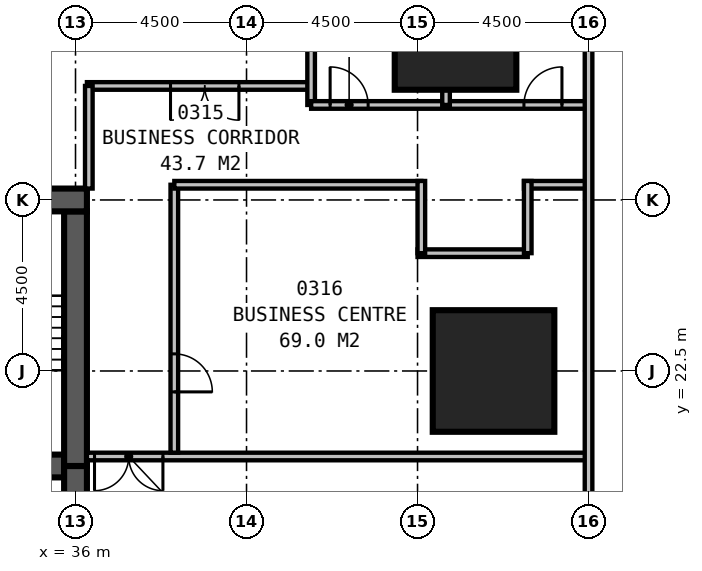
"""IFC4 building model, lengths in metres.
Left out: names, types, materials, properties, quantities, classifications, styles, units other than length and angle.
Written with IfcOpenShell. Run it as: python <this file> out.ifc"""

import sys

from ifc_helpers import new_model, si_unit, direction, frame, frame_2d, origin, origin_2d, place, context, subcontext, project, spatial, rectangle, extrude, element, fill, save


model = new_model("IFC4")
c1 = context("Model", 3, precision=1e-05, world=origin(), true_north=direction((0.0, 1.0)))
c2 = subcontext(c1, "Body", "Model", "MODEL_VIEW")
j1 = project(units=[si_unit("LENGTHUNIT", "METRE"), si_unit("PLANEANGLEUNIT", "RADIAN")], contexts=[c1])
p1 = place(None, origin())
s1 = spatial("IfcSite", under=j1, at=p1, CompositionType="ELEMENT")
p2 = place(p1, origin())
s2 = spatial("IfcBuilding", under=s1, at=p2, CompositionType="ELEMENT")
p3 = place(p2, frame((0.0, 0.0, 19.0)))
s3 = spatial("IfcBuildingStorey", under=s2, at=p3, CompositionType="ELEMENT", Elevation=19.0)
for number, where, z_axis, x_axis in (
    (1, (47.0, 22.5, 0.0), (0.0, 0.0, 1.0), (1.0, 0.0, 0.0)),
    (2, (46.0, 31.5, 0.0), (0.0, 0.0, 1.0), (1.0, 0.0, 0.0)),
):
    element("IfcColumn", number, at=place(p3, frame(where, z_axis=z_axis, x_axis=x_axis)), inside=s3, PredefinedType="COLUMN", context=c2, shape_type="SweptSolid", body=[
        extrude(rectangle(XDim=3.2, YDim=3.2, at=origin_2d()), origin(), (0.0, 0.0, 1.0), 5.0),
    ])
p4 = place(p3, frame((36.3, 27.0, 0.0), z_axis=(0.0, 0.0, 1.0), x_axis=(-1.0, 0.0, 0.0)))
e3 = element("IfcWall", 3, at=p4, inside=s3, PredefinedType="SHEAR", context=c2, shape_type="SweptSolid", body=[
    extrude(rectangle(XDim=23.1, YDim=0.6, at=frame_2d((11.55, 0.0))), origin(), (0.0, 0.0, 1.0), 5.0),
])
p5 = place(p4, frame((17.05, 0.0, 0.0)))
e4 = element("IfcOpeningElement", 4, at=p5, cuts=e3, PredefinedType="OPENING", context=c2, shape_type="SweptSolid", body=[
    extrude(rectangle(XDim=1.0, YDim=2.1, at=frame_2d((0.5, 1.05))), frame((0.0, 0.31, 0.0), z_axis=(0.0, -1.0, 0.0), x_axis=(1.0, 0.0, 0.0)), (0.0, 0.0, 1.0), 0.62),
])
p6 = place(p4, frame((12.05, 0.0, 0.0)))
e5 = element("IfcOpeningElement", 5, at=p6, cuts=e3, PredefinedType="OPENING", context=c2, shape_type="SweptSolid", body=[
    extrude(rectangle(XDim=1.0, YDim=2.1, at=frame_2d((0.5, 1.05))), frame((0.0, 0.31, 0.0), z_axis=(0.0, -1.0, 0.0), x_axis=(1.0, 0.0, 0.0)), (0.0, 0.0, 1.0), 0.62),
])
p7 = place(p4, frame((7.05, 0.0, 0.0)))
e6 = element("IfcOpeningElement", 6, at=p7, cuts=e3, PredefinedType="OPENING", context=c2, shape_type="SweptSolid", body=[
    extrude(rectangle(XDim=1.0, YDim=2.1, at=frame_2d((0.5, 1.05))), frame((0.0, 0.31, 0.0), z_axis=(0.0, -1.0, 0.0), x_axis=(1.0, 0.0, 0.0)), (0.0, 0.0, 1.0), 0.62),
])
p8 = place(p3, frame((13.8, 20.0, 0.0), z_axis=(0.0, 0.0, 1.0), x_axis=(1.0, 0.0, 0.0)))
e7 = element("IfcWall", 7, at=p8, inside=s3, PredefinedType="SHEAR", context=c2, shape_type="SweptSolid", body=[
    extrude(rectangle(XDim=21.9, YDim=0.6, at=frame_2d((10.95, 0.0))), origin(), (0.0, 0.0, 1.0), 5.0),
])
p9 = place(p8, frame((0.5, 0.0, 0.0)))
e8 = element("IfcOpeningElement", 8, at=p9, cuts=e7, PredefinedType="OPENING", context=c2, shape_type="SweptSolid", body=[
    extrude(rectangle(XDim=1.0, YDim=2.1, at=frame_2d((0.5, 1.05))), frame((0.0, 0.31, 0.0), z_axis=(0.0, -1.0, 0.0), x_axis=(1.0, 0.0, 0.0)), (0.0, 0.0, 1.0), 0.62),
])
p10 = place(p8, frame((20.5, 0.0, 0.0)))
e9 = element("IfcOpeningElement", 9, at=p10, cuts=e7, PredefinedType="OPENING", context=c2, shape_type="SweptSolid", body=[
    extrude(rectangle(XDim=1.0, YDim=2.1, at=frame_2d((0.5, 1.05))), frame((0.0, 0.31, 0.0), z_axis=(0.0, -1.0, 0.0), x_axis=(1.0, 0.0, 0.0)), (0.0, 0.0, 1.0), 0.62),
])
p11 = place(p8, frame((16.65, 0.0, 0.0)))
e10 = element("IfcOpeningElement", 10, at=p11, cuts=e7, PredefinedType="OPENING", context=c2, shape_type="SweptSolid", body=[
    extrude(rectangle(XDim=1.1, YDim=2.1, at=frame_2d((0.55, 1.05))), frame((0.0, 0.31, 0.0), z_axis=(0.0, -1.0, 0.0), x_axis=(1.0, 0.0, 0.0)), (0.0, 0.0, 1.0), 0.62),
])
p12 = place(p3, frame((36.0, 16.5, 0.0), z_axis=(0.0, 0.0, 1.0), x_axis=(0.0, 1.0, 0.0)))
e11 = element("IfcWall", 11, at=p12, inside=s3, PredefinedType="SHEAR", context=c2, shape_type="SweptSolid", body=[
    extrude(rectangle(XDim=3.5, YDim=0.6, at=frame_2d((1.75, 0.0))), origin(), (0.0, 0.0, 1.0), 5.0),
])
p13 = place(p12, frame((0.65, 0.0, 0.0)))
e12 = element("IfcOpeningElement", 12, at=p13, cuts=e11, PredefinedType="OPENING", context=c2, shape_type="SweptSolid", body=[
    extrude(rectangle(XDim=1.2, YDim=2.1, at=frame_2d((0.6, 1.05))), frame((0.0, 0.31, 0.0), z_axis=(0.0, -1.0, 0.0), x_axis=(1.0, 0.0, 0.0)), (0.0, 0.0, 1.0), 0.62),
])
p14 = place(p3, frame((36.0, 20.0, 0.0), z_axis=(0.0, 0.0, 1.0), x_axis=(0.0, 1.0, 0.0)))
e13 = element("IfcWall", 13, at=p14, inside=s3, PredefinedType="SHEAR", context=c2, shape_type="SweptSolid", body=[
    extrude(rectangle(XDim=6.7, YDim=0.6, at=frame_2d((3.35, 0.0))), origin(), (0.0, 0.0, 1.0), 5.0),
])
p15 = place(p3, frame((49.5, 10.4, 0.0), z_axis=(0.0, 0.0, 1.0), x_axis=(0.0, 1.0, 0.0)))
e14 = element("IfcWall", 14, at=p15, inside=s3, PredefinedType="PARTITIONING", context=c2, shape_type="SweptSolid", body=[
    extrude(rectangle(XDim=30.1, YDim=0.2, at=frame_2d((15.05, 0.0))), origin(), (0.0, 0.0, 1.0), 4.7),
])
p16 = place(p15, frame((27.1, 0.0, 0.0)))
e15 = element("IfcOpeningElement", 15, at=p16, cuts=e14, PredefinedType="OPENING", context=c2, shape_type="SweptSolid", body=[
    extrude(rectangle(XDim=1.0, YDim=2.1, at=frame_2d((0.5, 1.05))), frame((0.0, 0.11, 0.0), z_axis=(0.0, -1.0, 0.0), x_axis=(1.0, 0.0, 0.0)), (0.0, 0.0, 1.0), 0.22),
])
p17 = place(p15, frame((4.8, 0.0, 0.0)))
e16 = element("IfcOpeningElement", 16, at=p17, cuts=e14, PredefinedType="OPENING", context=c2, shape_type="SweptSolid", body=[
    extrude(rectangle(XDim=1.2, YDim=2.1, at=frame_2d((0.6, 1.05))), frame((0.0, 0.11, 0.0), z_axis=(0.0, -1.0, 0.0), x_axis=(1.0, 0.0, 0.0)), (0.0, 0.0, 1.0), 0.22),
])
p18 = place(p3, frame((36.3, 20.25, 0.0), z_axis=(0.0, 0.0, 1.0), x_axis=(1.0, 0.0, 0.0)))
e17 = element("IfcWall", 17, at=p18, inside=s3, PredefinedType="PARTITIONING", context=c2, shape_type="SweptSolid", body=[
    extrude(rectangle(XDim=13.2, YDim=0.2, at=frame_2d((6.6, 0.0))), origin(), (0.0, 0.0, 1.0), 4.7),
])
p19 = place(p18, frame((2.0, 0.0, 0.0), z_axis=(0.0, 0.0, 1.0), x_axis=(-1.0, 0.0, 0.0)))
e18 = element("IfcOpeningElement", 18, at=p19, cuts=e17, PredefinedType="OPENING", context=c2, shape_type="SweptSolid", body=[
    extrude(rectangle(XDim=1.8, YDim=2.4, at=frame_2d((0.9, 1.2))), frame((0.0, 0.11, 0.0), z_axis=(0.0, -1.0, 0.0), x_axis=(1.0, 0.0, 0.0)), (0.0, 0.0, 1.0), 0.22),
])
p20 = place(p3, frame((38.6, 20.35, 0.0), z_axis=(0.0, 0.0, 1.0), x_axis=(0.0, 1.0, 0.0)))
e19 = element("IfcWall", 19, at=p20, inside=s3, PredefinedType="PARTITIONING", context=c2, shape_type="SweptSolid", body=[
    extrude(rectangle(XDim=7.05, YDim=0.2, at=frame_2d((3.525, 0.0))), origin(), (0.0, 0.0, 1.0), 4.7),
])
p21 = place(p20, frame((2.6, 0.0, 0.0), z_axis=(0.0, 0.0, 1.0), x_axis=(-1.0, 0.0, 0.0)))
e20 = element("IfcOpeningElement", 20, at=p21, cuts=e19, PredefinedType="OPENING", context=c2, shape_type="SweptSolid", body=[
    extrude(rectangle(XDim=1.0, YDim=2.1, at=frame_2d((0.5, 1.05))), frame((0.0, 0.11, 0.0), z_axis=(0.0, -1.0, 0.0), x_axis=(1.0, 0.0, 0.0)), (0.0, 0.0, 1.0), 0.22),
])
p22 = place(p3, frame((38.6, 27.4, 0.0), z_axis=(0.0, 0.0, 1.0), x_axis=(1.0, 0.0, 0.0)))
e21 = element("IfcWall", 21, at=p22, inside=s3, PredefinedType="PARTITIONING", context=c2, shape_type="SweptSolid", body=[
    extrude(rectangle(XDim=6.5, YDim=0.2, at=frame_2d((3.25, 0.0))), origin(), (0.0, 0.0, 1.0), 3.3),
])
p23 = place(p3, frame((45.1, 25.6, 0.0), z_axis=(0.0, 0.0, 1.0), x_axis=(0.0, 1.0, 0.0)))
e22 = element("IfcWall", 22, at=p23, inside=s3, PredefinedType="PARTITIONING", context=c2, shape_type="SweptSolid", body=[
    extrude(rectangle(XDim=1.9, YDim=0.2, at=frame_2d((0.95, 0.0))), origin(), (0.0, 0.0, 1.0), 4.7),
])
p24 = place(p3, frame((45.0, 25.6, 0.0), z_axis=(0.0, 0.0, 1.0), x_axis=(1.0, 0.0, 0.0)))
e23 = element("IfcWall", 23, at=p24, inside=s3, PredefinedType="PARTITIONING", context=c2, shape_type="SweptSolid", body=[
    extrude(rectangle(XDim=2.9, YDim=0.2, at=frame_2d((1.45, 0.0))), origin(), (0.0, 0.0, 1.0), 4.7),
])
p25 = place(p3, frame((47.9, 25.6, 0.0), z_axis=(0.0, 0.0, 1.0), x_axis=(0.0, 1.0, 0.0)))
e24 = element("IfcWall", 24, at=p25, inside=s3, PredefinedType="PARTITIONING", context=c2, shape_type="SweptSolid", body=[
    extrude(rectangle(XDim=1.9, YDim=0.2, at=frame_2d((0.95, 0.0))), origin(), (0.0, 0.0, 1.0), 4.7),
])
p26 = place(p3, frame((47.8, 27.4, 0.0), z_axis=(0.0, 0.0, 1.0), x_axis=(1.0, 0.0, 0.0)))
e25 = element("IfcWall", 25, at=p26, inside=s3, PredefinedType="PARTITIONING", context=c2, shape_type="SweptSolid", body=[
    extrude(rectangle(XDim=1.7, YDim=0.2, at=frame_2d((0.85, 0.0))), origin(), (0.0, 0.0, 1.0), 4.7),
])
p27 = place(p3, frame((36.35, 27.3, 0.0), z_axis=(0.0, 0.0, 1.0), x_axis=(0.0, 1.0, 0.0)))
e26 = element("IfcWall", 26, at=p27, inside=s3, PredefinedType="PARTITIONING", context=c2, shape_type="SweptSolid", body=[
    extrude(rectangle(XDim=2.7, YDim=0.2, at=frame_2d((1.35, 0.0))), origin(), (0.0, 0.0, 1.0), 3.6),
])
p28 = place(p3, frame((36.3, 30.0, 0.0), z_axis=(0.0, 0.0, 1.0), x_axis=(1.0, 0.0, 0.0)))
e27 = element("IfcWall", 27, at=p28, inside=s3, PredefinedType="PARTITIONING", context=c2, shape_type="SweptSolid", body=[
    extrude(rectangle(XDim=5.9, YDim=0.2, at=frame_2d((2.95, 0.0))), origin(), (0.0, 0.0, 1.0), 4.7),
])
p29 = place(p28, frame((4.0, 0.0, 0.0), z_axis=(0.0, 0.0, 1.0), x_axis=(-1.0, 0.0, 0.0)))
e28 = element("IfcOpeningElement", 28, at=p29, cuts=e27, PredefinedType="OPENING", context=c2, shape_type="SweptSolid", body=[
    extrude(rectangle(XDim=1.8, YDim=2.4, at=frame_2d((0.9, 1.2))), frame((0.0, 0.11, 0.0), z_axis=(0.0, -1.0, 0.0), x_axis=(1.0, 0.0, 0.0)), (0.0, 0.0, 1.0), 0.22),
])
p30 = place(p3, frame((42.2, 29.5, 0.0), z_axis=(0.0, 0.0, 1.0), x_axis=(1.0, 0.0, 0.0)))
e29 = element("IfcWall", 29, at=p30, inside=s3, PredefinedType="PARTITIONING", context=c2, shape_type="SweptSolid", body=[
    extrude(rectangle(XDim=7.3, YDim=0.2, at=frame_2d((3.65, 0.0))), origin(), (0.0, 0.0, 1.0), 4.7),
])
p31 = place(p30, frame((0.5, 0.0, 0.0)))
e30 = element("IfcOpeningElement", 30, at=p31, cuts=e29, PredefinedType="OPENING", context=c2, shape_type="SweptSolid", body=[
    extrude(rectangle(XDim=1.0, YDim=2.1, at=frame_2d((0.5, 1.05))), frame((0.0, 0.11, 0.0), z_axis=(0.0, -1.0, 0.0), x_axis=(1.0, 0.0, 0.0)), (0.0, 0.0, 1.0), 0.22),
])
p32 = place(p30, frame((5.6, 0.0, 0.0)))
e31 = element("IfcOpeningElement", 31, at=p32, cuts=e29, PredefinedType="OPENING", context=c2, shape_type="SweptSolid", body=[
    extrude(rectangle(XDim=1.0, YDim=2.1, at=frame_2d((0.5, 1.05))), frame((0.0, 0.11, 0.0), z_axis=(0.0, -1.0, 0.0), x_axis=(1.0, 0.0, 0.0)), (0.0, 0.0, 1.0), 0.22),
])
p33 = place(p3, frame((42.2, 29.5, 0.0), z_axis=(0.0, 0.0, 1.0), x_axis=(0.0, 1.0, 0.0)))
e32 = element("IfcWall", 32, at=p33, inside=s3, PredefinedType="PARTITIONING", context=c2, shape_type="SweptSolid", body=[
    extrude(rectangle(XDim=11.0, YDim=0.2, at=frame_2d((5.5, 0.0))), origin(), (0.0, 0.0, 1.0), 4.7),
])
p34 = place(p3, frame((45.75, 29.5, 0.0), z_axis=(0.0, 0.0, 1.0), x_axis=(0.0, 1.0, 0.0)))
e33 = element("IfcWall", 33, at=p34, inside=s3, PredefinedType="PARTITIONING", context=c2, shape_type="SweptSolid", body=[
    extrude(rectangle(XDim=0.4, YDim=0.2, at=frame_2d((0.2, 0.0))), origin(), (0.0, 0.0, 1.0), 4.7),
])
p35 = place(p19, origin())
e34 = element("IfcDoor", 34, at=p35, inside=s3, OperationType="DOUBLE_DOOR_SINGLE_SWING", PredefinedType="DOOR", context=c2, shape_type="SweptSolid", body=[
    extrude(rectangle(XDim=1.8, YDim=2.4, at=frame_2d((0.9, 1.2))), frame((0.0, 0.025, 0.0), z_axis=(0.0, -1.0, 0.0), x_axis=(1.0, 0.0, 0.0)), (0.0, 0.0, 1.0), 0.05),
])
fill(e18, e34)
p36 = place(p21, origin())
e35 = element("IfcDoor", 35, at=p36, inside=s3, OperationType="SINGLE_SWING_RIGHT", PredefinedType="DOOR", context=c2, shape_type="SweptSolid", body=[
    extrude(rectangle(XDim=1.0, YDim=2.1, at=frame_2d((0.5, 1.05))), frame((0.0, 0.025, 0.0), z_axis=(0.0, -1.0, 0.0), x_axis=(1.0, 0.0, 0.0)), (0.0, 0.0, 1.0), 0.05),
])
fill(e20, e35)
p37 = place(p29, origin())
e36 = element("IfcDoor", 36, at=p37, inside=s3, OperationType="DOUBLE_DOOR_SINGLE_SWING", PredefinedType="DOOR", context=c2, shape_type="SweptSolid", body=[
    extrude(rectangle(XDim=1.8, YDim=2.4, at=frame_2d((0.9, 1.2))), frame((0.0, 0.025, 0.0), z_axis=(0.0, -1.0, 0.0), x_axis=(1.0, 0.0, 0.0)), (0.0, 0.0, 1.0), 0.05),
])
fill(e28, e36)
p38 = place(p31, origin())
e37 = element("IfcDoor", 37, at=p38, inside=s3, OperationType="SINGLE_SWING_LEFT", PredefinedType="DOOR", context=c2, shape_type="SweptSolid", body=[
    extrude(rectangle(XDim=1.0, YDim=2.1, at=frame_2d((0.5, 1.05))), frame((0.0, 0.025, 0.0), z_axis=(0.0, -1.0, 0.0), x_axis=(1.0, 0.0, 0.0)), (0.0, 0.0, 1.0), 0.05),
])
fill(e30, e37)
p39 = place(p32, origin())
e38 = element("IfcDoor", 38, at=p39, inside=s3, OperationType="SINGLE_SWING_RIGHT", PredefinedType="DOOR", context=c2, shape_type="SweptSolid", body=[
    extrude(rectangle(XDim=1.0, YDim=2.1, at=frame_2d((0.5, 1.05))), frame((0.0, 0.025, 0.0), z_axis=(0.0, -1.0, 0.0), x_axis=(1.0, 0.0, 0.0)), (0.0, 0.0, 1.0), 0.05),
])
fill(e31, e38)
save(model, sys.argv[1])
